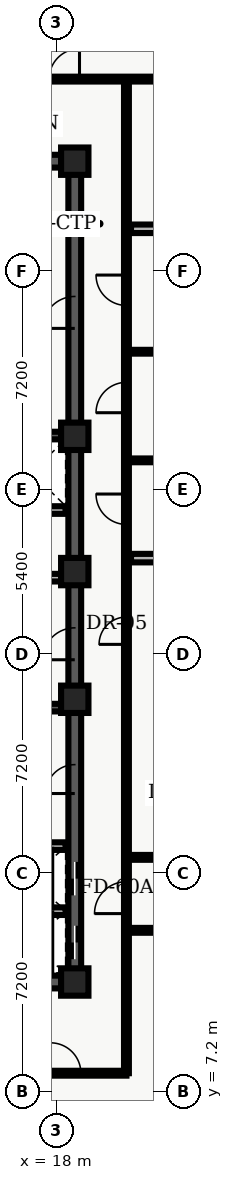
"""IFC4 building model, lengths in metres.
Left out: names, types, materials, properties, quantities, classifications, styles, units other than length and angle.
Written with IfcOpenShell. Run it as: python <this file> out.ifc"""

import sys

from ifc_helpers import new_model, entity, si_unit, converted_unit, direction, frame, origin_with_axes, origin_2d_with_axis, place, context, subcontext, project, spatial, polyline, rectangle, outline, extrude, element, fill, save


model = new_model("IFC4")
c1 = context("Model", 3, precision=1e-05, world=origin_with_axes(), true_north=direction((0.0, 1.0)))
c2 = subcontext(c1, "Body", "Model", "MODEL_VIEW")
j1 = project(units=[si_unit("LENGTHUNIT", "METRE"), converted_unit("PLANEANGLEUNIT", "DEGREE", entity("IfcPlaneAngleMeasure", 0.017), si_unit("PLANEANGLEUNIT", "RADIAN"), dimensions=[0, 0, 0, 0, 0, 0, 0])], contexts=[c1])
p1 = place(None, origin_with_axes())
s1 = spatial("IfcSite", under=j1, at=p1, CompositionType="ELEMENT")
p2 = place(p1, origin_with_axes())
s2 = spatial("IfcBuilding", under=s1, at=p2, CompositionType="ELEMENT")
p3 = place(p2, frame((0.0, 0.0, 228.6), z_axis=(0.0, 0.0, 1.0), x_axis=(1.0, 0.0, 0.0)))
s3 = spatial("IfcBuildingStorey", under=s2, at=p3, CompositionType="ELEMENT", Elevation=228.6)
p4 = place(p3, frame((11.4, 10.8, 0.0), z_axis=(0.0, 0.0, 1.0), x_axis=(1.0, 0.0, 0.0)))
e1 = element("IfcWall", 1, at=p4, inside=s3, PredefinedType="SHEAR", context=c2, shape_type="SweptSolid", body=[
    extrude(outline(polyline([(0.0, -0.21), (7.2, -0.21), (7.2, 0.21), (0.0, 0.21), (0.0, -0.21)])), origin_with_axes(), (0.0, 0.0, 1.0), 3.66),
])
p5 = place(p4, frame((2.625, 0.0, 0.0), z_axis=(0.0, 0.0, 1.0), x_axis=(1.0, 0.0, 0.0)))
e2 = element("IfcOpeningElement", 2, at=p5, cuts=e1, PredefinedType="OPENING", context=c2, shape_type="SweptSolid", body=[
    extrude(rectangle(XDim=1.05, YDim=0.44, at=origin_2d_with_axis()), origin_with_axes(), (0.0, 0.0, 1.0), 2.15),
])
p6 = place(p3, frame((11.4, 37.8, 0.0), z_axis=(0.0, 0.0, 1.0), x_axis=(1.0, 0.0, 0.0)))
e3 = element("IfcWall", 3, at=p6, inside=s3, PredefinedType="SHEAR", context=c2, shape_type="SweptSolid", body=[
    extrude(outline(polyline([(0.0, -0.21), (7.2, -0.21), (7.2, 0.21), (0.0, 0.21), (0.0, -0.21)])), origin_with_axes(), (0.0, 0.0, 1.0), 3.66),
])
p7 = place(p6, frame((2.625, 0.0, 0.0), z_axis=(0.0, 0.0, 1.0), x_axis=(1.0, 0.0, 0.0)))
e4 = element("IfcOpeningElement", 4, at=p7, cuts=e3, PredefinedType="OPENING", context=c2, shape_type="SweptSolid", body=[
    extrude(rectangle(XDim=1.05, YDim=0.44, at=origin_2d_with_axis()), origin_with_axes(), (0.0, 0.0, 1.0), 2.15),
])
p8 = place(p3, frame((18.6, 10.8, 0.0), z_axis=(0.0, 0.0, 1.0), x_axis=(0.0, 1.0, 0.0)))
e5 = element("IfcWall", 5, at=p8, inside=s3, PredefinedType="SHEAR", context=c2, shape_type="SweptSolid", body=[
    extrude(outline(polyline([(0.0, -0.21), (13.5, -0.21), (13.5, 0.21), (0.0, 0.21), (0.0, -0.21)])), origin_with_axes(), (0.0, 0.0, 1.0), 3.66),
])
p9 = place(p8, frame((1.3, 0.0, 0.0), z_axis=(0.0, 0.0, 1.0), x_axis=(1.0, 0.0, 0.0)))
e6 = element("IfcOpeningElement", 6, at=p9, cuts=e5, PredefinedType="OPENING", context=c2, shape_type="SweptSolid", body=[
    extrude(rectangle(XDim=1.1, YDim=0.44, at=origin_2d_with_axis()), origin_with_axes(), (0.0, 0.0, 1.0), 2.15),
])
p10 = place(p8, frame((3.4, 0.0, 0.0), z_axis=(0.0, 0.0, 1.0), x_axis=(1.0, 0.0, 0.0)))
e7 = element("IfcOpeningElement", 7, at=p10, cuts=e5, PredefinedType="OPENING", context=c2, shape_type="SweptSolid", body=[
    extrude(rectangle(XDim=1.1, YDim=0.44, at=origin_2d_with_axis()), origin_with_axes(), (0.0, 0.0, 1.0), 2.15),
])
p11 = place(p8, frame((11.125, 0.0, 0.0), z_axis=(0.0, 0.0, 1.0), x_axis=(1.0, 0.0, 0.0)))
e8 = element("IfcOpeningElement", 8, at=p11, cuts=e5, PredefinedType="OPENING", context=c2, shape_type="SweptSolid", body=[
    extrude(rectangle(XDim=1.05, YDim=0.44, at=origin_2d_with_axis()), origin_with_axes(), (0.0, 0.0, 1.0), 2.15),
])
p12 = place(p8, frame((6.675, 0.0, 0.0), z_axis=(0.0, 0.0, 1.0), x_axis=(1.0, 0.0, 0.0)))
e9 = element("IfcOpeningElement", 9, at=p12, cuts=e5, PredefinedType="OPENING", context=c2, shape_type="SweptSolid", body=[
    extrude(rectangle(XDim=0.95, YDim=0.44, at=origin_2d_with_axis()), origin_with_axes(), (0.0, 0.0, 1.0), 2.15),
])
p13 = place(p3, frame((18.6, 24.3, 0.0), z_axis=(0.0, 0.0, 1.0), x_axis=(0.0, 1.0, 0.0)))
e10 = element("IfcWall", 10, at=p13, inside=s3, PredefinedType="SHEAR", context=c2, shape_type="SweptSolid", body=[
    extrude(outline(polyline([(0.0, -0.21), (13.5, -0.21), (13.5, 0.21), (0.0, 0.21), (0.0, -0.21)])), origin_with_axes(), (0.0, 0.0, 1.0), 3.66),
])
p14 = place(p13, frame((8.525, 0.0, 0.0), z_axis=(0.0, 0.0, 1.0), x_axis=(1.0, 0.0, 0.0)))
e11 = element("IfcOpeningElement", 11, at=p14, cuts=e10, PredefinedType="OPENING", context=c2, shape_type="SweptSolid", body=[
    extrude(rectangle(XDim=1.05, YDim=0.44, at=origin_2d_with_axis()), origin_with_axes(), (0.0, 0.0, 1.0), 2.15),
])
for number, where, z_axis, x_axis in (
    (12, (11.61, 19.825, 0.0), (0.0, 0.0, 1.0), (1.0, 0.0, 0.0)),
    (13, (11.61, 28.775, 0.0), (0.0, 0.0, 1.0), (1.0, 0.0, 0.0)),
):
    element("IfcWall", number, at=place(p3, frame(where, z_axis=z_axis, x_axis=x_axis)), inside=s3, PredefinedType="SHEAR", context=c2, shape_type="SweptSolid", body=[
        extrude(outline(polyline([(0.0, -0.125), (6.78, -0.125), (6.78, 0.125), (0.0, 0.125), (0.0, -0.125)])), origin_with_axes(), (0.0, 0.0, 1.0), 3.66),
    ])
p15 = place(p3, frame((11.7, 24.1, 0.0), z_axis=(0.0, 0.0, 1.0), x_axis=(1.0, 0.0, 0.0)))
e14 = element("IfcWall", 14, at=p15, inside=s3, PredefinedType="SOLIDWALL", context=c2, shape_type="SweptSolid", body=[
    extrude(outline(polyline([(0.0, -0.125), (6.6, -0.125), (6.6, 0.125), (0.0, 0.125), (0.0, -0.125)])), origin_with_axes(), (0.0, 0.0, 1.0), 2.7),
])
p16 = place(p15, frame((3.75, 0.0, 0.0), z_axis=(0.0, 0.0, 1.0), x_axis=(1.0, 0.0, 0.0)))
e15 = element("IfcOpeningElement", 15, at=p16, cuts=e14, PredefinedType="OPENING", context=c2, shape_type="SweptSolid", body=[
    extrude(rectangle(XDim=0.9, YDim=0.27, at=origin_2d_with_axis()), origin_with_axes(), (0.0, 0.0, 1.0), 2.15),
])
p17 = place(p3, frame((11.7, 26.325, 0.0), z_axis=(0.0, 0.0, 1.0), x_axis=(1.0, 0.0, 0.0)))
e16 = element("IfcWall", 16, at=p17, inside=s3, PredefinedType="SOLIDWALL", context=c2, shape_type="SweptSolid", body=[
    extrude(outline(polyline([(0.0, -0.125), (6.6, -0.125), (6.6, 0.125), (0.0, 0.125), (0.0, -0.125)])), origin_with_axes(), (0.0, 0.0, 1.0), 2.7),
])
p18 = place(p17, frame((3.5, 0.0, 0.0), z_axis=(0.0, 0.0, 1.0), x_axis=(1.0, 0.0, 0.0)))
e17 = element("IfcOpeningElement", 17, at=p18, cuts=e16, PredefinedType="OPENING", context=c2, shape_type="SweptSolid", body=[
    extrude(rectangle(XDim=0.9, YDim=0.27, at=origin_2d_with_axis()), origin_with_axes(), (0.0, 0.0, 1.0), 2.15),
])
for number, where, z_axis, x_axis in (
    (18, (18.6, 10.8, 0.0), (0.0, 0.0, 1.0), (1.0, 0.0, 0.0)),
    (19, (18.6, 20.1, 0.0), (0.0, 0.0, 1.0), (1.0, 0.0, 0.0)),
    (20, (18.6, 24.3, 0.0), (0.0, 0.0, 1.0), (1.0, 0.0, 0.0)),
    (21, (18.6, 28.75, 0.0), (0.0, 0.0, 1.0), (1.0, 0.0, 0.0)),
    (22, (18.6, 37.8, 0.0), (0.0, 0.0, 1.0), (1.0, 0.0, 0.0)),
):
    element("IfcColumn", number, at=place(p3, frame(where, z_axis=z_axis, x_axis=x_axis)), inside=s3, PredefinedType="COLUMN", context=c2, shape_type="SweptSolid", body=[
        extrude(rectangle(XDim=0.9, YDim=0.9, at=origin_2d_with_axis()), origin_with_axes(), (0.0, 0.0, 1.0), 3.9),
    ])
for number, where, z_axis, x_axis in (
    (23, (15.84, 13.13, 0.0), (0.0, 0.0, 1.0), (1.0, 0.0, 0.0)),
    (24, (15.84, 15.27, 0.0), (0.0, 0.0, 1.0), (1.0, 0.0, 0.0)),
):
    element("IfcWall", number, at=place(p3, frame(where, z_axis=z_axis, x_axis=x_axis)), inside=s3, PredefinedType="SOLIDWALL", context=c2, shape_type="SweptSolid", body=[
        extrude(outline(polyline([(0.0, -0.125), (2.46, -0.125), (2.46, 0.125), (0.0, 0.125), (0.0, -0.125)])), origin_with_axes(), (0.0, 0.0, 1.0), 2.7),
    ])
p19 = place(p3, frame((7.1, 7.8, 0.0), z_axis=(0.0, 0.0, 1.0), x_axis=(1.0, 0.0, 0.0)))
e25 = element("IfcWall", 25, at=p19, inside=s3, PredefinedType="PARTITIONING", context=c2, shape_type="SweptSolid", body=[
    extrude(outline(polyline([(0.0, -0.08), (13.2, -0.08), (13.2, 0.08), (0.0, 0.08), (0.0, -0.08)])), origin_with_axes(), (0.0, 0.0, 1.0), 2.7),
])
p20 = place(p19, frame((2.929, 0.0, 0.0), z_axis=(0.0, 0.0, 1.0), x_axis=(1.0, 0.0, 0.0)))
e26 = element("IfcOpeningElement", 26, at=p20, cuts=e25, PredefinedType="OPENING", context=c2, shape_type="SweptSolid", body=[
    extrude(rectangle(XDim=1.0, YDim=0.18, at=origin_2d_with_axis()), origin_with_axes(), (0.0, 0.0, 1.0), 2.15),
])
p21 = place(p19, frame((7.56, 0.0, 0.0), z_axis=(0.0, 0.0, 1.0), x_axis=(1.0, 0.0, 0.0)))
e27 = element("IfcOpeningElement", 27, at=p21, cuts=e25, PredefinedType="OPENING", context=c2, shape_type="SweptSolid", body=[
    extrude(rectangle(XDim=1.0, YDim=0.18, at=origin_2d_with_axis()), origin_with_axes(), (0.0, 0.0, 1.0), 2.15),
])
p22 = place(p19, frame((11.201, 0.0, 0.0), z_axis=(0.0, 0.0, 1.0), x_axis=(1.0, 0.0, 0.0)))
e28 = element("IfcOpeningElement", 28, at=p22, cuts=e25, PredefinedType="OPENING", context=c2, shape_type="SweptSolid", body=[
    extrude(rectangle(XDim=1.0, YDim=0.18, at=origin_2d_with_axis()), origin_with_axes(), (0.0, 0.0, 1.0), 2.15),
])
p23 = place(p3, frame((7.1, 40.5, 0.0), z_axis=(0.0, 0.0, 1.0), x_axis=(1.0, 0.0, 0.0)))
e29 = element("IfcWall", 29, at=p23, inside=s3, PredefinedType="PARTITIONING", context=c2, shape_type="SweptSolid", body=[
    extrude(outline(polyline([(0.0, -0.08), (24.965, -0.08), (24.965, 0.08), (0.0, 0.08), (0.0, -0.08)])), origin_with_axes(), (0.0, 0.0, 1.0), 2.7),
])
p24 = place(p23, frame((1.441, 0.0, 0.0), z_axis=(0.0, 0.0, 1.0), x_axis=(1.0, 0.0, 0.0)))
e30 = element("IfcOpeningElement", 30, at=p24, cuts=e29, PredefinedType="OPENING", context=c2, shape_type="SweptSolid", body=[
    extrude(rectangle(XDim=1.0, YDim=0.18, at=origin_2d_with_axis()), origin_with_axes(), (0.0, 0.0, 1.0), 2.15),
])
p25 = place(p23, frame((4.415, 0.0, 0.0), z_axis=(0.0, 0.0, 1.0), x_axis=(1.0, 0.0, 0.0)))
e31 = element("IfcOpeningElement", 31, at=p25, cuts=e29, PredefinedType="OPENING", context=c2, shape_type="SweptSolid", body=[
    extrude(rectangle(XDim=1.0, YDim=0.18, at=origin_2d_with_axis()), origin_with_axes(), (0.0, 0.0, 1.0), 2.15),
])
p26 = place(p23, frame((7.614, 0.0, 0.0), z_axis=(0.0, 0.0, 1.0), x_axis=(1.0, 0.0, 0.0)))
e32 = element("IfcOpeningElement", 32, at=p26, cuts=e29, PredefinedType="OPENING", context=c2, shape_type="SweptSolid", body=[
    extrude(rectangle(XDim=1.0, YDim=0.18, at=origin_2d_with_axis()), origin_with_axes(), (0.0, 0.0, 1.0), 2.15),
])
p27 = place(p23, frame((11.156, 0.0, 0.0), z_axis=(0.0, 0.0, 1.0), x_axis=(1.0, 0.0, 0.0)))
e33 = element("IfcOpeningElement", 33, at=p27, cuts=e29, PredefinedType="OPENING", context=c2, shape_type="SweptSolid", body=[
    extrude(rectangle(XDim=1.0, YDim=0.18, at=origin_2d_with_axis()), origin_with_axes(), (0.0, 0.0, 1.0), 2.15),
])
p28 = place(p3, frame((20.3, 7.8, 0.0), z_axis=(0.0, 0.0, 1.0), x_axis=(0.0, 1.0, 0.0)))
e34 = element("IfcWall", 34, at=p28, inside=s3, PredefinedType="PARTITIONING", context=c2, shape_type="SweptSolid", body=[
    extrude(outline(polyline([(0.0, -0.08), (32.7, -0.08), (32.7, 0.08), (0.0, 0.08), (0.0, -0.08)])), origin_with_axes(), (0.0, 0.0, 1.0), 2.7),
])
p29 = place(p28, frame((14.556, 0.0, 0.0), z_axis=(0.0, 0.0, 1.0), x_axis=(1.0, 0.0, 0.0)))
e35 = element("IfcOpeningElement", 35, at=p29, cuts=e34, PredefinedType="OPENING", context=c2, shape_type="SweptSolid", body=[
    extrude(rectangle(XDim=0.9, YDim=0.18, at=origin_2d_with_axis()), origin_with_axes(), (0.0, 0.0, 1.0), 2.15),
])
p30 = place(p28, frame((18.551, 0.0, 0.0), z_axis=(0.0, 0.0, 1.0), x_axis=(1.0, 0.0, 0.0)))
e36 = element("IfcOpeningElement", 36, at=p30, cuts=e34, PredefinedType="OPENING", context=c2, shape_type="SweptSolid", body=[
    extrude(rectangle(XDim=1.0, YDim=0.18, at=origin_2d_with_axis()), origin_with_axes(), (0.0, 0.0, 1.0), 2.15),
])
p31 = place(p28, frame((22.226, 0.0, 0.0), z_axis=(0.0, 0.0, 1.0), x_axis=(1.0, 0.0, 0.0)))
e37 = element("IfcOpeningElement", 37, at=p31, cuts=e34, PredefinedType="OPENING", context=c2, shape_type="SweptSolid", body=[
    extrude(rectangle(XDim=1.0, YDim=0.18, at=origin_2d_with_axis()), origin_with_axes(), (0.0, 0.0, 1.0), 2.15),
])
p32 = place(p28, frame((25.754, 0.0, 0.0), z_axis=(0.0, 0.0, 1.0), x_axis=(1.0, 0.0, 0.0)))
e38 = element("IfcOpeningElement", 38, at=p32, cuts=e34, PredefinedType="OPENING", context=c2, shape_type="SweptSolid", body=[
    extrude(rectangle(XDim=1.0, YDim=0.18, at=origin_2d_with_axis()), origin_with_axes(), (0.0, 0.0, 1.0), 2.15),
])
p33 = place(p28, frame((5.775, 0.0, 0.0), z_axis=(0.0, 0.0, 1.0), x_axis=(1.0, 0.0, 0.0)))
e39 = element("IfcOpeningElement", 39, at=p33, cuts=e34, PredefinedType="OPENING", context=c2, shape_type="SweptSolid", body=[
    extrude(rectangle(XDim=1.05, YDim=0.18, at=origin_2d_with_axis()), origin_with_axes(), (0.0, 0.0, 1.0), 2.15),
])
p34 = place(p3, frame((20.45, 24.743, 0.0), z_axis=(0.0, 0.0, 1.0), x_axis=(1.0, 0.0, 0.0)))
e40 = element("IfcWall", 40, at=p34, inside=s3, PredefinedType="PARTITIONING", context=c2, shape_type="SweptSolid", body=[
    extrude(outline(polyline([(0.0, -0.14), (11.615, -0.14), (11.615, 0.14), (0.0, 0.14), (0.0, -0.14)])), origin_with_axes(), (0.0, 0.0, 1.0), 2.7),
])
for number, where, z_axis, x_axis in (
    (41, (20.45, 27.959, 0.0), (0.0, 0.0, 1.0), (1.0, 0.0, 0.0)),
    (42, (20.45, 31.532, 0.0), (0.0, 0.0, 1.0), (1.0, 0.0, 0.0)),
):
    element("IfcWall", number, at=place(p3, frame(where, z_axis=z_axis, x_axis=x_axis)), inside=s3, PredefinedType="PARTITIONING", context=c2, shape_type="SweptSolid", body=[
        extrude(outline(polyline([(0.0, -0.062), (11.615, -0.062), (11.615, 0.062), (0.0, 0.062), (0.0, -0.062)])), origin_with_axes(), (0.0, 0.0, 1.0), 2.7),
    ])
p35 = place(p3, frame((20.45, 35.576, 0.0), z_axis=(0.0, 0.0, 1.0), x_axis=(1.0, 0.0, 0.0)))
e43 = element("IfcWall", 43, at=p35, inside=s3, PredefinedType="PARTITIONING", context=c2, shape_type="SweptSolid", body=[
    extrude(outline(polyline([(0.0, -0.14), (11.615, -0.14), (11.615, 0.14), (0.0, 0.14), (0.0, -0.14)])), origin_with_axes(), (0.0, 0.0, 1.0), 2.7),
])
p36 = place(p35, frame((5.785, 0.0, 0.0), z_axis=(0.0, 0.0, 1.0), x_axis=(1.0, 0.0, 0.0)))
e44 = element("IfcOpeningElement", 44, at=p36, cuts=e43, PredefinedType="OPENING", context=c2, shape_type="SweptSolid", body=[
    extrude(rectangle(XDim=0.95, YDim=0.3, at=origin_2d_with_axis()), origin_with_axes(), (0.0, 0.0, 1.0), 2.15),
])
p37 = place(p3, frame((20.3, 12.5, 0.0), z_axis=(0.0, 0.0, 1.0), x_axis=(1.0, 0.0, 0.0)))
e45 = element("IfcWall", 45, at=p37, inside=s3, PredefinedType="PARTITIONING", context=c2, shape_type="SweptSolid", body=[
    extrude(outline(polyline([(0.0, -0.08), (16.05, -0.08), (16.05, 0.08), (0.0, 0.08), (0.0, -0.08)])), origin_with_axes(), (0.0, 0.0, 1.0), 2.7),
])
p38 = place(p37, frame((3.865, 0.0, 0.0), z_axis=(0.0, 0.0, 1.0), x_axis=(1.0, 0.0, 0.0)))
e46 = element("IfcOpeningElement", 46, at=p38, cuts=e45, PredefinedType="OPENING", context=c2, shape_type="SweptSolid", body=[
    extrude(rectangle(XDim=1.2, YDim=0.18, at=origin_2d_with_axis()), origin_with_axes(), (0.0, 0.0, 1.0), 2.2),
])
p39 = place(p37, frame((9.48, 0.0, 0.0), z_axis=(0.0, 0.0, 1.0), x_axis=(1.0, 0.0, 0.0)))
e47 = element("IfcOpeningElement", 47, at=p39, cuts=e45, PredefinedType="OPENING", context=c2, shape_type="SweptSolid", body=[
    extrude(rectangle(XDim=1.0, YDim=0.18, at=origin_2d_with_axis()), origin_with_axes(), (0.0, 0.0, 1.0), 2.15),
])
p40 = place(p37, frame((13.691, 0.0, 0.0), z_axis=(0.0, 0.0, 1.0), x_axis=(1.0, 0.0, 0.0)))
e48 = element("IfcOpeningElement", 48, at=p40, cuts=e45, PredefinedType="OPENING", context=c2, shape_type="SweptSolid", body=[
    extrude(rectangle(XDim=1.0, YDim=0.18, at=origin_2d_with_axis()), origin_with_axes(), (0.0, 0.0, 1.0), 2.15),
])
p41 = place(p3, frame((20.3, 14.9, 0.0), z_axis=(0.0, 0.0, 1.0), x_axis=(1.0, 0.0, 0.0)))
e49 = element("IfcWall", 49, at=p41, inside=s3, PredefinedType="PARTITIONING", context=c2, shape_type="SweptSolid", body=[
    extrude(outline(polyline([(0.0, -0.08), (16.05, -0.08), (16.05, 0.08), (0.0, 0.08), (0.0, -0.08)])), origin_with_axes(), (0.0, 0.0, 1.0), 2.7),
])
p42 = place(p41, frame((8.075, 0.0, 0.0), z_axis=(0.0, 0.0, 1.0), x_axis=(1.0, 0.0, 0.0)))
e50 = element("IfcOpeningElement", 50, at=p42, cuts=e49, PredefinedType="OPENING", context=c2, shape_type="SweptSolid", body=[
    extrude(rectangle(XDim=1.2, YDim=0.18, at=origin_2d_with_axis()), origin_with_axes(), (0.0, 0.0, 1.0), 2.2),
])
p43 = place(p8, frame((1.3, 0.0, 0.0), z_axis=(0.0, 0.0, 1.0), x_axis=(1.0, 0.0, 0.0)))
e51 = element("IfcDoor", 51, at=p43, inside=s3, OperationType="SLIDING_TO_LEFT", PredefinedType="DOOR", context=c2, shape_type="SweptSolid", body=[
    extrude(rectangle(XDim=1.1, YDim=0.09, at=origin_2d_with_axis()), origin_with_axes(), (0.0, 0.0, 1.0), 2.15),
])
fill(e6, e51)
p44 = place(p8, frame((3.4, 0.0, 0.0), z_axis=(0.0, 0.0, 1.0), x_axis=(1.0, 0.0, 0.0)))
e52 = element("IfcDoor", 52, at=p44, inside=s3, OperationType="SLIDING_TO_RIGHT", PredefinedType="DOOR", context=c2, shape_type="SweptSolid", body=[
    extrude(rectangle(XDim=1.1, YDim=0.09, at=origin_2d_with_axis()), origin_with_axes(), (0.0, 0.0, 1.0), 2.15),
])
fill(e7, e52)
p45 = place(p8, frame((11.125, 0.0, 0.0), z_axis=(0.0, 0.0, 1.0), x_axis=(1.0, 0.0, 0.0)))
e53 = element("IfcDoor", 53, at=p45, inside=s3, OperationType="SINGLE_SWING_LEFT", PredefinedType="DOOR", context=c2, shape_type="SweptSolid", body=[
    extrude(rectangle(XDim=1.05, YDim=0.09, at=origin_2d_with_axis()), origin_with_axes(), (0.0, 0.0, 1.0), 2.15),
])
fill(e8, e53)
p46 = place(p8, frame((6.675, 0.0, 0.0), z_axis=(0.0, 0.0, 1.0), x_axis=(1.0, 0.0, 0.0)))
e54 = element("IfcDoor", 54, at=p46, inside=s3, OperationType="SINGLE_SWING_LEFT", PredefinedType="DOOR", context=c2, shape_type="SweptSolid", body=[
    extrude(rectangle(XDim=0.95, YDim=0.09, at=origin_2d_with_axis()), origin_with_axes(), (0.0, 0.0, 1.0), 2.15),
])
fill(e9, e54)
p47 = place(p13, frame((8.525, 0.0, 0.0), z_axis=(0.0, 0.0, 1.0), x_axis=(1.0, 0.0, 0.0)))
e55 = element("IfcDoor", 55, at=p47, inside=s3, OperationType="SINGLE_SWING_LEFT", PredefinedType="DOOR", context=c2, shape_type="SweptSolid", body=[
    extrude(rectangle(XDim=1.05, YDim=0.09, at=origin_2d_with_axis()), origin_with_axes(), (0.0, 0.0, 1.0), 2.15),
])
fill(e11, e55)
p48 = place(p19, frame((11.201, 0.0, 0.0), z_axis=(0.0, 0.0, 1.0), x_axis=(1.0, 0.0, 0.0)))
e56 = element("IfcDoor", 56, at=p48, inside=s3, OperationType="SINGLE_SWING_LEFT", PredefinedType="DOOR", context=c2, shape_type="SweptSolid", body=[
    extrude(rectangle(XDim=1.0, YDim=0.09, at=origin_2d_with_axis()), origin_with_axes(), (0.0, 0.0, 1.0), 2.15),
])
fill(e28, e56)
p49 = place(p23, frame((11.156, 0.0, 0.0), z_axis=(0.0, 0.0, 1.0), x_axis=(1.0, 0.0, 0.0)))
e57 = element("IfcDoor", 57, at=p49, inside=s3, OperationType="SINGLE_SWING_RIGHT", PredefinedType="DOOR", context=c2, shape_type="SweptSolid", body=[
    extrude(rectangle(XDim=1.0, YDim=0.09, at=origin_2d_with_axis()), origin_with_axes(), (0.0, 0.0, 1.0), 2.15),
])
fill(e33, e57)
p50 = place(p28, frame((14.556, 0.0, 0.0), z_axis=(0.0, 0.0, 1.0), x_axis=(1.0, 0.0, 0.0)))
e58 = element("IfcDoor", 58, at=p50, inside=s3, OperationType="SINGLE_SWING_LEFT", PredefinedType="DOOR", context=c2, shape_type="SweptSolid", body=[
    extrude(rectangle(XDim=0.9, YDim=0.09, at=origin_2d_with_axis()), origin_with_axes(), (0.0, 0.0, 1.0), 2.15),
])
fill(e35, e58)
p51 = place(p28, frame((18.551, 0.0, 0.0), z_axis=(0.0, 0.0, 1.0), x_axis=(1.0, 0.0, 0.0)))
e59 = element("IfcDoor", 59, at=p51, inside=s3, OperationType="SINGLE_SWING_RIGHT", PredefinedType="DOOR", context=c2, shape_type="SweptSolid", body=[
    extrude(rectangle(XDim=1.0, YDim=0.09, at=origin_2d_with_axis()), origin_with_axes(), (0.0, 0.0, 1.0), 2.15),
])
fill(e36, e59)
p52 = place(p28, frame((22.226, 0.0, 0.0), z_axis=(0.0, 0.0, 1.0), x_axis=(1.0, 0.0, 0.0)))
e60 = element("IfcDoor", 60, at=p52, inside=s3, OperationType="SINGLE_SWING_LEFT", PredefinedType="DOOR", context=c2, shape_type="SweptSolid", body=[
    extrude(rectangle(XDim=1.0, YDim=0.09, at=origin_2d_with_axis()), origin_with_axes(), (0.0, 0.0, 1.0), 2.15),
])
fill(e37, e60)
p53 = place(p28, frame((25.754, 0.0, 0.0), z_axis=(0.0, 0.0, 1.0), x_axis=(1.0, 0.0, 0.0)))
e61 = element("IfcDoor", 61, at=p53, inside=s3, OperationType="SINGLE_SWING_RIGHT", PredefinedType="DOOR", context=c2, shape_type="SweptSolid", body=[
    extrude(rectangle(XDim=1.0, YDim=0.09, at=origin_2d_with_axis()), origin_with_axes(), (0.0, 0.0, 1.0), 2.15),
])
fill(e38, e61)
p54 = place(p28, frame((5.775, 0.0, 0.0), z_axis=(0.0, 0.0, 1.0), x_axis=(1.0, 0.0, 0.0)))
e62 = element("IfcDoor", 62, at=p54, inside=s3, OperationType="SINGLE_SWING_LEFT", PredefinedType="DOOR", context=c2, shape_type="SweptSolid", body=[
    extrude(rectangle(XDim=1.05, YDim=0.09, at=origin_2d_with_axis()), origin_with_axes(), (0.0, 0.0, 1.0), 2.15),
])
fill(e39, e62)
save(model, sys.argv[1])
